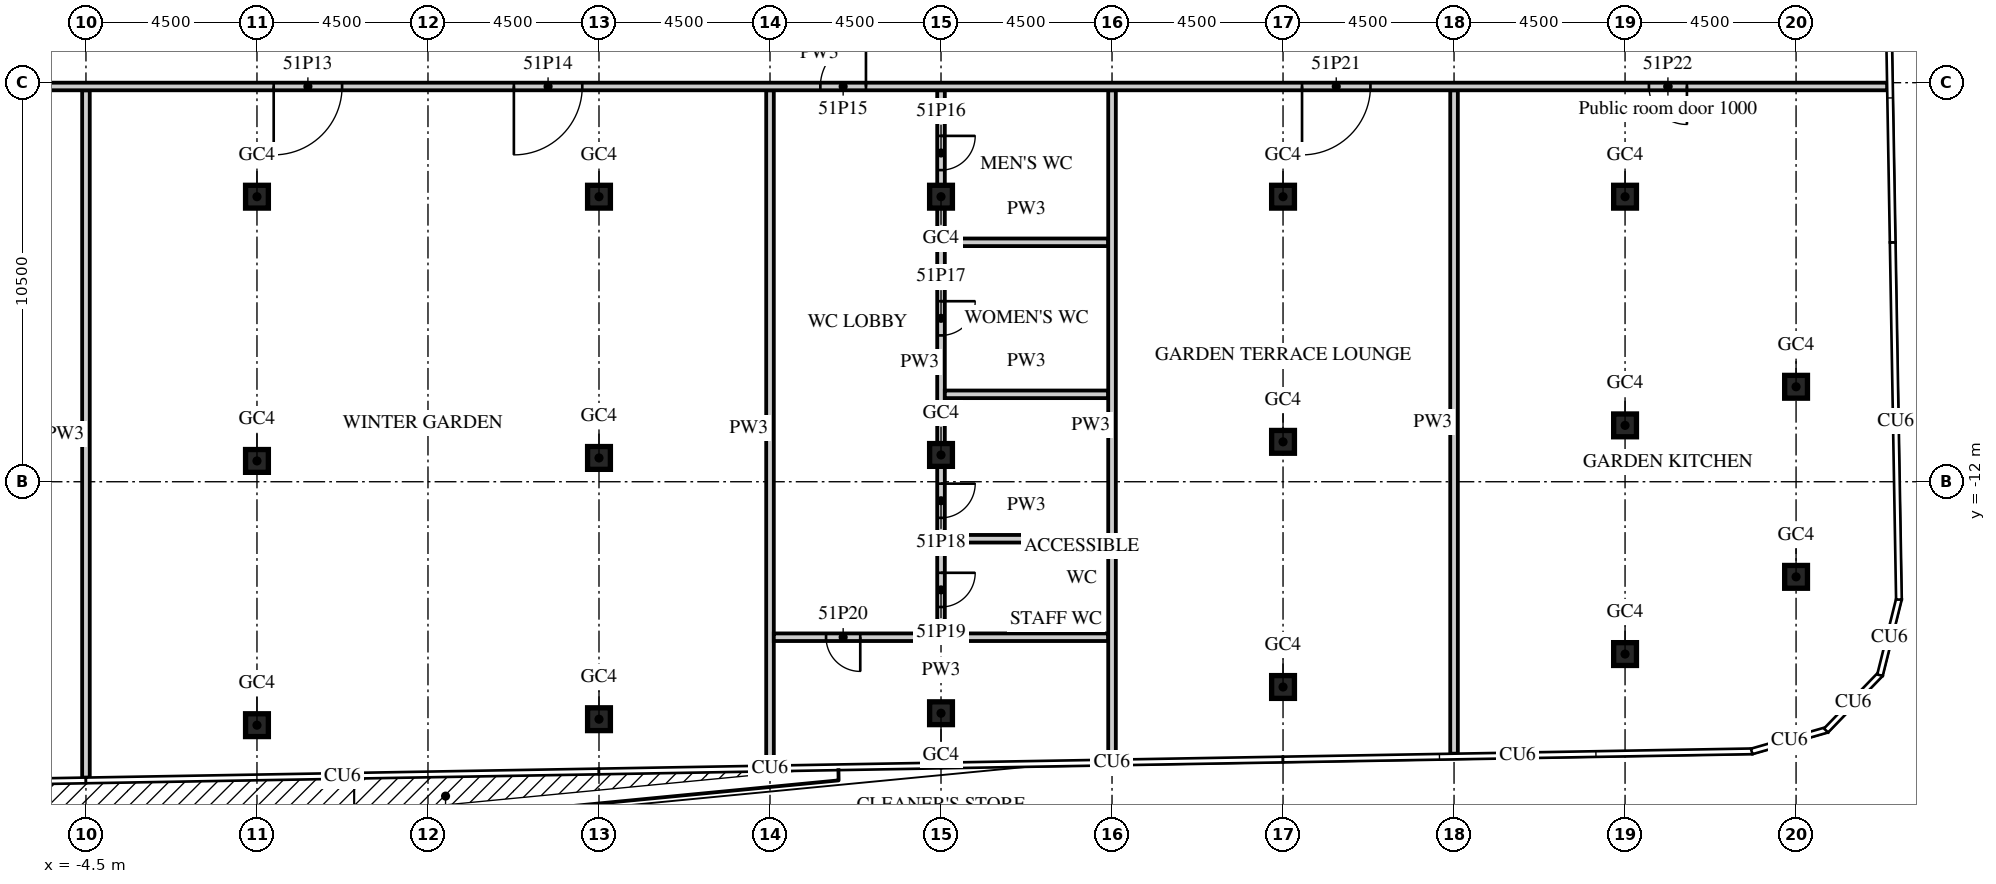
"""IFC4 building model, lengths in metres.
Left out: names, types, materials, properties, quantities, classifications, styles, units other than length and angle.
Written with IfcOpenShell. Run it as: python <this file> out.ifc"""

import sys

from ifc_helpers import new_model, si_unit, direction, frame, frame_2d, origin, origin_2d, place, context, subcontext, project, spatial, rectangle, extrude, element, fill, save


model = new_model("IFC4")
c1 = context("Model", 3, precision=1e-05, world=origin(), true_north=direction((0.0, 1.0)))
c2 = subcontext(c1, "Body", "Model", "MODEL_VIEW")
j1 = project(units=[si_unit("LENGTHUNIT", "METRE"), si_unit("PLANEANGLEUNIT", "RADIAN")], contexts=[c1])
p1 = place(None, origin())
s1 = spatial("IfcSite", under=j1, at=p1, CompositionType="ELEMENT")
p2 = place(p1, origin())
s2 = spatial("IfcBuilding", under=s1, at=p2, CompositionType="ELEMENT")
p3 = place(p2, frame((0.0, 0.0, 211.1)))
s3 = spatial("IfcBuildingStorey", under=s2, at=p3, CompositionType="ELEMENT", Elevation=211.1)
for number, where, z_axis, x_axis in (
    (1, (0.0, -18.406, 0.0), (0.0, 0.0, 1.0), (1.0, 0.0, 0.0)),
    (2, (0.0, -11.453, 0.0), (0.0, 0.0, 1.0), (1.0, 0.0, 0.0)),
    (3, (0.0, -4.5, 0.0), (0.0, 0.0, 1.0), (1.0, 0.0, 0.0)),
    (4, (9.0, -18.248, 0.0), (0.0, 0.0, 1.0), (1.0, 0.0, 0.0)),
    (5, (9.0, -11.374, 0.0), (0.0, 0.0, 1.0), (1.0, 0.0, 0.0)),
    (6, (9.0, -4.5, 0.0), (0.0, 0.0, 1.0), (1.0, 0.0, 0.0)),
    (7, (18.0, -18.091, 0.0), (0.0, 0.0, 1.0), (1.0, 0.0, 0.0)),
    (8, (18.0, -11.296, 0.0), (0.0, 0.0, 1.0), (1.0, 0.0, 0.0)),
    (9, (18.0, -4.5, 0.0), (0.0, 0.0, 1.0), (1.0, 0.0, 0.0)),
    (10, (27.0, -17.401, 0.0), (0.0, 0.0, 1.0), (1.0, 0.0, 0.0)),
    (11, (27.0, -10.95, 0.0), (0.0, 0.0, 1.0), (1.0, 0.0, 0.0)),
    (12, (27.0, -4.5, 0.0), (0.0, 0.0, 1.0), (1.0, 0.0, 0.0)),
    (13, (36.0, -16.534, 0.0), (0.0, 0.0, 1.0), (1.0, 0.0, 0.0)),
    (14, (36.0, -10.517, 0.0), (0.0, 0.0, 1.0), (1.0, 0.0, 0.0)),
    (15, (36.0, -4.5, 0.0), (0.0, 0.0, 1.0), (1.0, 0.0, 0.0)),
    (16, (40.5, -14.503, 0.0), (0.0, 0.0, 1.0), (1.0, 0.0, 0.0)),
    (17, (40.5, -9.501, 0.0), (0.0, 0.0, 1.0), (1.0, 0.0, 0.0)),
):
    element("IfcColumn", number, at=place(p3, frame(where, z_axis=z_axis, x_axis=x_axis)), inside=s3, PredefinedType="COLUMN", context=c2, shape_type="SweptSolid", body=[
        extrude(rectangle(XDim=0.6, YDim=0.6, at=origin_2d()), origin(), (0.0, 0.0, 1.0), 5.32),
    ])
p4 = place(p3, frame((-4.5, -19.784, 0.0), z_axis=(0.0, 0.0, 1.0), x_axis=(0.0, 1.0, 0.0)))
e18 = element("IfcWall", 18, at=p4, inside=s3, PredefinedType="PARTITIONING", context=c2, shape_type="SweptSolid", body=[
    extrude(rectangle(XDim=18.084, YDim=0.2, at=frame_2d((9.042, 0.0))), origin(), (0.0, 0.0, 1.0), 6.32),
])
p5 = place(p3, frame((13.5, -19.47, 0.0), z_axis=(0.0, 0.0, 1.0), x_axis=(0.0, 1.0, 0.0)))
e19 = element("IfcWall", 19, at=p5, inside=s3, PredefinedType="PARTITIONING", context=c2, shape_type="SweptSolid", body=[
    extrude(rectangle(XDim=17.77, YDim=0.2, at=frame_2d((8.885, 0.0))), origin(), (0.0, 0.0, 1.0), 6.32),
])
p6 = place(p3, frame((18.0, -15.991, 0.0), z_axis=(0.0, 0.0, 1.0), x_axis=(0.0, 1.0, 0.0)))
e20 = element("IfcWall", 20, at=p6, inside=s3, PredefinedType="PARTITIONING", context=c2, shape_type="SweptSolid", body=[
    extrude(rectangle(XDim=14.291, YDim=0.2, at=frame_2d((7.146, 0.0))), origin(), (0.0, 0.0, 1.0), 5.32),
])
p7 = place(p6, frame((12.191, 0.0, 0.0)))
e21 = element("IfcOpeningElement", 21, at=p7, cuts=e20, PredefinedType="OPENING", context=c2, shape_type="SweptSolid", body=[
    extrude(rectangle(XDim=0.9, YDim=2.1, at=frame_2d((0.45, 1.05))), frame((0.0, 0.11, 0.0), z_axis=(0.0, -1.0, 0.0), x_axis=(1.0, 0.0, 0.0)), (0.0, 0.0, 1.0), 0.22),
])
p8 = place(p6, frame((7.841, 0.0, 0.0)))
e22 = element("IfcOpeningElement", 22, at=p8, cuts=e20, PredefinedType="OPENING", context=c2, shape_type="SweptSolid", body=[
    extrude(rectangle(XDim=0.9, YDim=2.1, at=frame_2d((0.45, 1.05))), frame((0.0, 0.11, 0.0), z_axis=(0.0, -1.0, 0.0), x_axis=(1.0, 0.0, 0.0)), (0.0, 0.0, 1.0), 0.22),
])
p9 = place(p6, frame((3.041, 0.0, 0.0)))
e23 = element("IfcOpeningElement", 23, at=p9, cuts=e20, PredefinedType="OPENING", context=c2, shape_type="SweptSolid", body=[
    extrude(rectangle(XDim=0.9, YDim=2.1, at=frame_2d((0.45, 1.05))), frame((0.0, 0.11, 0.0), z_axis=(0.0, -1.0, 0.0), x_axis=(1.0, 0.0, 0.0)), (0.0, 0.0, 1.0), 0.22),
])
p10 = place(p6, frame((0.695, 0.0, 0.0)))
e24 = element("IfcOpeningElement", 24, at=p10, cuts=e20, PredefinedType="OPENING", context=c2, shape_type="SweptSolid", body=[
    extrude(rectangle(XDim=0.9, YDim=2.1, at=frame_2d((0.45, 1.05))), frame((0.0, 0.11, 0.0), z_axis=(0.0, -1.0, 0.0), x_axis=(1.0, 0.0, 0.0)), (0.0, 0.0, 1.0), 0.22),
])
for number, where, z_axis, x_axis in (
    (25, (18.1, -5.7, 0.0), (0.0, 0.0, 1.0), (1.0, 0.0, 0.0)),
    (26, (18.1, -9.7, 0.0), (0.0, 0.0, 1.0), (1.0, 0.0, 0.0)),
    (27, (18.1, -13.5, 0.0), (0.0, 0.0, 1.0), (1.0, 0.0, 0.0)),
):
    element("IfcWall", number, at=place(p3, frame(where, z_axis=z_axis, x_axis=x_axis)), inside=s3, PredefinedType="PARTITIONING", context=c2, shape_type="SweptSolid", body=[
        extrude(rectangle(XDim=4.3, YDim=0.2, at=frame_2d((2.15, 0.0))), origin(), (0.0, 0.0, 1.0), 5.32),
    ])
p11 = place(p3, frame((13.6, -16.091, 0.0), z_axis=(0.0, 0.0, 1.0), x_axis=(1.0, 0.0, 0.0)))
e28 = element("IfcWall", 28, at=p11, inside=s3, PredefinedType="PARTITIONING", context=c2, shape_type="SweptSolid", body=[
    extrude(rectangle(XDim=8.8, YDim=0.2, at=frame_2d((4.4, 0.0))), origin(), (0.0, 0.0, 1.0), 5.32),
])
p12 = place(p11, frame((1.375, 0.0, 0.0)))
e29 = element("IfcOpeningElement", 29, at=p12, cuts=e28, PredefinedType="OPENING", context=c2, shape_type="SweptSolid", body=[
    extrude(rectangle(XDim=0.9, YDim=2.1, at=frame_2d((0.45, 1.05))), frame((0.0, 0.11, 0.0), z_axis=(0.0, -1.0, 0.0), x_axis=(1.0, 0.0, 0.0)), (0.0, 0.0, 1.0), 0.22),
])
p13 = place(p3, frame((22.5, -19.313, 0.0), z_axis=(0.0, 0.0, 1.0), x_axis=(0.0, 1.0, 0.0)))
e30 = element("IfcWall", 30, at=p13, inside=s3, PredefinedType="PARTITIONING", context=c2, shape_type="SweptSolid", body=[
    extrude(rectangle(XDim=17.613, YDim=0.2, at=frame_2d((8.806, 0.0))), origin(), (0.0, 0.0, 1.0), 6.32),
])
p14 = place(p3, frame((31.5, -19.156, 0.0), z_axis=(0.0, 0.0, 1.0), x_axis=(0.0, 1.0, 0.0)))
e31 = element("IfcWall", 31, at=p14, inside=s3, PredefinedType="PARTITIONING", context=c2, shape_type="SweptSolid", body=[
    extrude(rectangle(XDim=17.456, YDim=0.2, at=frame_2d((8.728, 0.0))), origin(), (0.0, 0.0, 1.0), 6.32),
])
p15 = place(p3, frame((-13.3, -1.6, 0.0), z_axis=(0.0, 0.0, 1.0), x_axis=(1.0, 0.0, 0.0)))
e32 = element("IfcWall", 32, at=p15, inside=s3, PredefinedType="PARTITIONING", context=c2, shape_type="SweptSolid", body=[
    extrude(rectangle(XDim=56.196, YDim=0.2, at=frame_2d((28.098, 0.0))), origin(), (0.0, 0.0, 1.0), 5.32),
])
p16 = place(p15, frame((4.65, 0.0, 0.0)))
e33 = element("IfcOpeningElement", 33, at=p16, cuts=e32, PredefinedType="OPENING", context=c2, shape_type="SweptSolid", body=[
    extrude(rectangle(XDim=1.8, YDim=2.1, at=frame_2d((0.9, 1.05))), frame((0.0, 0.11, 0.0), z_axis=(0.0, -1.0, 0.0), x_axis=(1.0, 0.0, 0.0)), (0.0, 0.0, 1.0), 0.22),
])
p17 = place(p15, frame((13.74, 0.0, 0.0)))
e34 = element("IfcOpeningElement", 34, at=p17, cuts=e32, PredefinedType="OPENING", context=c2, shape_type="SweptSolid", body=[
    extrude(rectangle(XDim=1.8, YDim=2.1, at=frame_2d((0.9, 1.05))), frame((0.0, 0.11, 0.0), z_axis=(0.0, -1.0, 0.0), x_axis=(1.0, 0.0, 0.0)), (0.0, 0.0, 1.0), 0.22),
])
p18 = place(p15, frame((20.06, 0.0, 0.0)))
e35 = element("IfcOpeningElement", 35, at=p18, cuts=e32, PredefinedType="OPENING", context=c2, shape_type="SweptSolid", body=[
    extrude(rectangle(XDim=1.8, YDim=2.1, at=frame_2d((0.9, 1.05))), frame((0.0, 0.11, 0.0), z_axis=(0.0, -1.0, 0.0), x_axis=(1.0, 0.0, 0.0)), (0.0, 0.0, 1.0), 0.22),
])
p19 = place(p15, frame((28.125, 0.0, 0.0)))
e36 = element("IfcOpeningElement", 36, at=p19, cuts=e32, PredefinedType="OPENING", context=c2, shape_type="SweptSolid", body=[
    extrude(rectangle(XDim=1.2, YDim=2.1, at=frame_2d((0.6, 1.05))), frame((0.0, 0.11, 0.0), z_axis=(0.0, -1.0, 0.0), x_axis=(1.0, 0.0, 0.0)), (0.0, 0.0, 1.0), 0.22),
])
p20 = place(p15, frame((40.8, 0.0, 0.0)))
e37 = element("IfcOpeningElement", 37, at=p20, cuts=e32, PredefinedType="OPENING", context=c2, shape_type="SweptSolid", body=[
    extrude(rectangle(XDim=1.8, YDim=2.1, at=frame_2d((0.9, 1.05))), frame((0.0, 0.11, 0.0), z_axis=(0.0, -1.0, 0.0), x_axis=(1.0, 0.0, 0.0)), (0.0, 0.0, 1.0), 0.22),
])
p21 = place(p15, frame((49.928, 0.0, 0.0)))
e38 = element("IfcOpeningElement", 38, at=p21, cuts=e32, PredefinedType="OPENING", context=c2, shape_type="SweptSolid", body=[
    extrude(rectangle(XDim=1.0, YDim=2.1, at=frame_2d((0.5, 1.05))), frame((0.0, 0.11, 0.0), z_axis=(0.0, -1.0, 0.0), x_axis=(1.0, 0.0, 0.0)), (0.0, 0.0, 1.0), 0.22),
])
p22 = place(p17, origin())
e39 = element("IfcDoor", 39, at=p22, inside=s3, OperationType="DOUBLE_DOOR_DOUBLE_SWING", PredefinedType="DOOR", context=c2, shape_type="SweptSolid", body=[
    extrude(rectangle(XDim=1.8, YDim=2.1, at=frame_2d((0.9, 1.05))), frame((0.0, 0.025, 0.0), z_axis=(0.0, -1.0, 0.0), x_axis=(1.0, 0.0, 0.0)), (0.0, 0.0, 1.0), 0.05),
])
fill(e34, e39)
p23 = place(p18, origin())
e40 = element("IfcDoor", 40, at=p23, inside=s3, OperationType="DOUBLE_DOOR_DOUBLE_SWING", PredefinedType="DOOR", context=c2, shape_type="SweptSolid", body=[
    extrude(rectangle(XDim=1.8, YDim=2.1, at=frame_2d((0.9, 1.05))), frame((0.0, 0.025, 0.0), z_axis=(0.0, -1.0, 0.0), x_axis=(1.0, 0.0, 0.0)), (0.0, 0.0, 1.0), 0.05),
])
fill(e35, e40)
p24 = place(p19, origin())
e41 = element("IfcDoor", 41, at=p24, inside=s3, OperationType="SINGLE_SWING_RIGHT", PredefinedType="DOOR", context=c2, shape_type="SweptSolid", body=[
    extrude(rectangle(XDim=1.2, YDim=2.1, at=frame_2d((0.6, 1.05))), frame((0.0, 0.025, 0.0), z_axis=(0.0, -1.0, 0.0), x_axis=(1.0, 0.0, 0.0)), (0.0, 0.0, 1.0), 0.05),
])
fill(e36, e41)
p25 = place(p7, origin())
e42 = element("IfcDoor", 42, at=p25, inside=s3, OperationType="SINGLE_SWING_RIGHT", PredefinedType="DOOR", context=c2, shape_type="SweptSolid", body=[
    extrude(rectangle(XDim=0.9, YDim=2.1, at=frame_2d((0.45, 1.05))), frame((0.0, 0.025, 0.0), z_axis=(0.0, -1.0, 0.0), x_axis=(1.0, 0.0, 0.0)), (0.0, 0.0, 1.0), 0.05),
])
fill(e21, e42)
p26 = place(p8, origin())
e43 = element("IfcDoor", 43, at=p26, inside=s3, OperationType="SINGLE_SWING_RIGHT", PredefinedType="DOOR", context=c2, shape_type="SweptSolid", body=[
    extrude(rectangle(XDim=0.9, YDim=2.1, at=frame_2d((0.45, 1.05))), frame((0.0, 0.025, 0.0), z_axis=(0.0, -1.0, 0.0), x_axis=(1.0, 0.0, 0.0)), (0.0, 0.0, 1.0), 0.05),
])
fill(e22, e43)
p27 = place(p9, origin())
e44 = element("IfcDoor", 44, at=p27, inside=s3, OperationType="SINGLE_SWING_RIGHT", PredefinedType="DOOR", context=c2, shape_type="SweptSolid", body=[
    extrude(rectangle(XDim=0.9, YDim=2.1, at=frame_2d((0.45, 1.05))), frame((0.0, 0.025, 0.0), z_axis=(0.0, -1.0, 0.0), x_axis=(1.0, 0.0, 0.0)), (0.0, 0.0, 1.0), 0.05),
])
fill(e23, e44)
p28 = place(p10, origin())
e45 = element("IfcDoor", 45, at=p28, inside=s3, OperationType="SINGLE_SWING_RIGHT", PredefinedType="DOOR", context=c2, shape_type="SweptSolid", body=[
    extrude(rectangle(XDim=0.9, YDim=2.1, at=frame_2d((0.45, 1.05))), frame((0.0, 0.025, 0.0), z_axis=(0.0, -1.0, 0.0), x_axis=(1.0, 0.0, 0.0)), (0.0, 0.0, 1.0), 0.05),
])
fill(e24, e45)
p29 = place(p12, origin())
e46 = element("IfcDoor", 46, at=p29, inside=s3, OperationType="SINGLE_SWING_RIGHT", PredefinedType="DOOR", context=c2, shape_type="SweptSolid", body=[
    extrude(rectangle(XDim=0.9, YDim=2.1, at=frame_2d((0.45, 1.05))), frame((0.0, 0.025, 0.0), z_axis=(0.0, -1.0, 0.0), x_axis=(1.0, 0.0, 0.0)), (0.0, 0.0, 1.0), 0.05),
])
fill(e29, e46)
p30 = place(p20, origin())
e47 = element("IfcDoor", 47, at=p30, inside=s3, OperationType="DOUBLE_DOOR_DOUBLE_SWING", PredefinedType="DOOR", context=c2, shape_type="SweptSolid", body=[
    extrude(rectangle(XDim=1.8, YDim=2.1, at=frame_2d((0.9, 1.05))), frame((0.0, 0.025, 0.0), z_axis=(0.0, -1.0, 0.0), x_axis=(1.0, 0.0, 0.0)), (0.0, 0.0, 1.0), 0.05),
])
fill(e37, e47)
p31 = place(p21, origin())
e48 = element("IfcDoor", 48, at=p31, inside=s3, OperationType="SINGLE_SWING_RIGHT", PredefinedType="DOOR", context=c2, shape_type="SweptSolid", body=[
    extrude(rectangle(XDim=1.0, YDim=2.1, at=frame_2d((0.5, 1.05))), frame((0.0, 0.025, 0.0), z_axis=(0.0, -1.0, 0.0), x_axis=(1.0, 0.0, 0.0)), (0.0, 0.0, 1.0), 0.05),
])
fill(e38, e48)
save(model, sys.argv[1])
